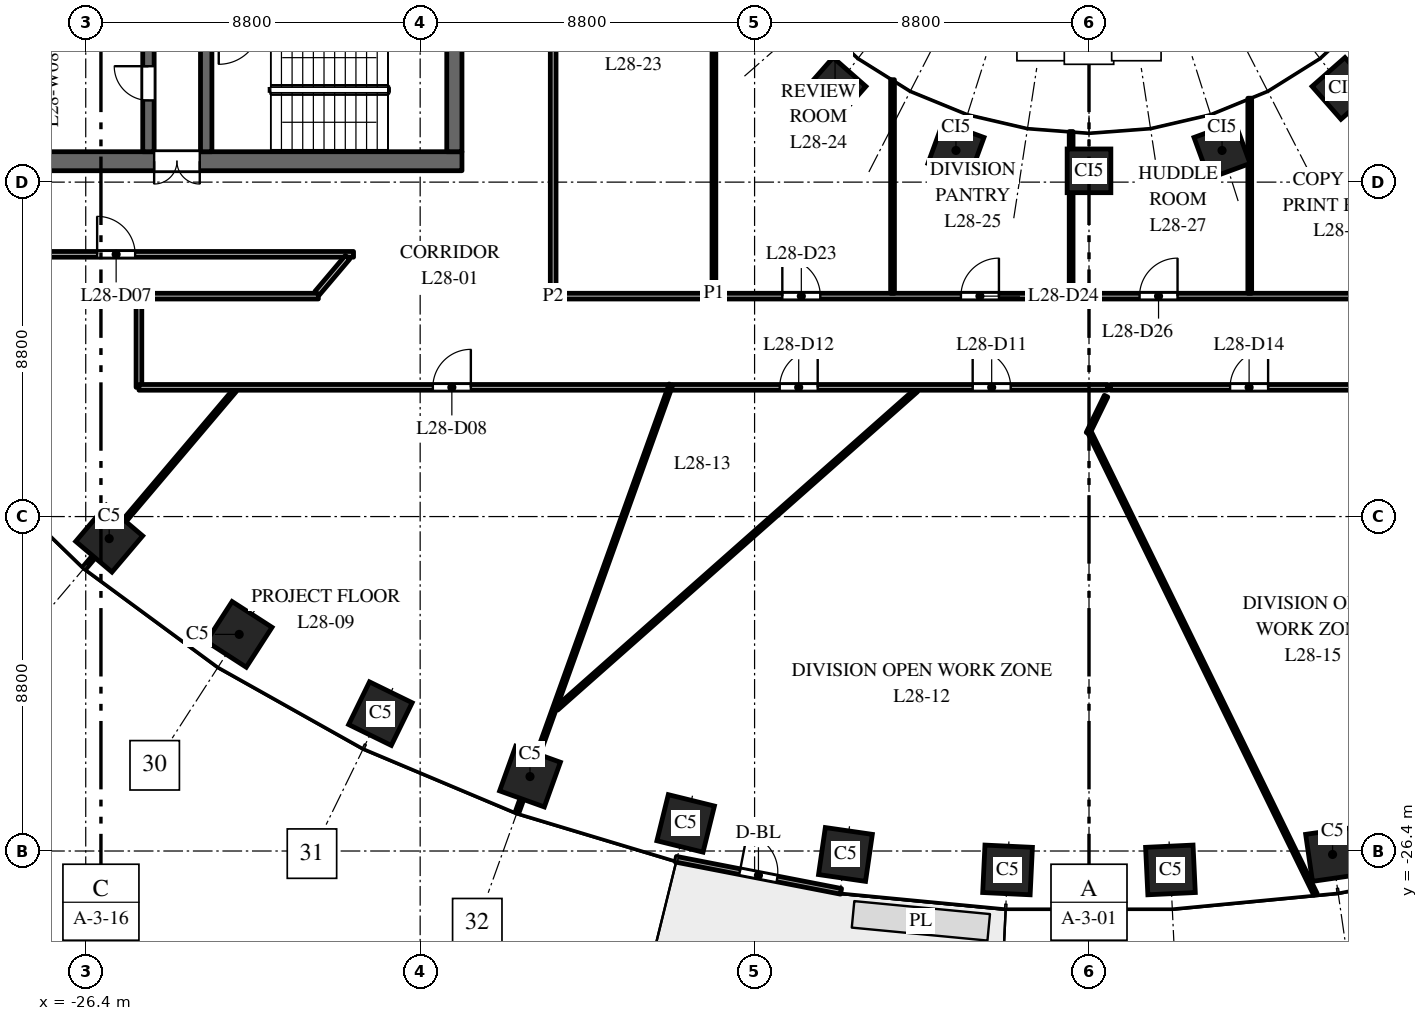
"""IFC4 building model, lengths in metres.
Left out: names, types, materials, properties, quantities, classifications, styles, units other than length and angle.
Written with IfcOpenShell. Run it as: python <this file> out.ifc"""

import sys

from ifc_helpers import new_model, si_unit, direction, frame, frame_2d, origin, origin_2d, place, context, subcontext, project, spatial, rectangle, extrude, element, fill, save


model = new_model("IFC4")
c1 = context("Model", 3, precision=1e-05, world=origin(), true_north=direction((0.0, 1.0)))
c2 = subcontext(c1, "Body", "Model", "MODEL_VIEW")
j1 = project(units=[si_unit("LENGTHUNIT", "METRE"), si_unit("PLANEANGLEUNIT", "RADIAN")], contexts=[c1])
p1 = place(None, origin())
s1 = spatial("IfcSite", under=j1, at=p1, CompositionType="ELEMENT")
p2 = place(p1, origin())
s2 = spatial("IfcBuilding", under=s1, at=p2, CompositionType="ELEMENT")
p3 = place(p2, frame((0.0, 0.0, 124.0)))
s3 = spatial("IfcBuildingStorey", under=s2, at=p3, CompositionType="ELEMENT", Elevation=124.0)
for number, where, z_axis, x_axis in (
    (1, (-25.783, -18.18, 0.0), (0.0, 0.0, 1.0), (0.763, -0.646, 0.0)),
    (2, (-22.362, -20.7, 0.0), (0.0, 0.0, 1.0), (0.84, -0.542, 0.0)),
    (3, (-18.646, -22.785, 0.0), (0.0, 0.0, 1.0), (0.898, -0.439, 0.0)),
    (4, (-14.709, -24.441, 0.0), (0.0, 0.0, 1.0), (0.941, -0.338, 0.0)),
    (5, (-10.613, -25.674, 0.0), (0.0, 0.0, 1.0), (0.971, -0.24, 0.0)),
    (6, (-6.409, -26.491, 0.0), (0.0, 0.0, 1.0), (0.99, -0.143, 0.0)),
    (7, (-2.143, -26.898, 0.0), (0.0, 0.0, 1.0), (0.999, -0.048, 0.0)),
    (8, (2.143, -26.898, 0.0), (0.0, 0.0, 1.0), (0.999, 0.048, 0.0)),
    (9, (6.409, -26.491, 0.0), (0.0, 0.0, 1.0), (0.99, 0.143, 0.0)),
):
    element("IfcColumn", number, at=place(p3, frame(where, z_axis=z_axis, x_axis=x_axis)), inside=s3, PredefinedType="COLUMN", context=c2, shape_type="SweptSolid", body=[
        extrude(rectangle(XDim=1.25, YDim=1.25, at=origin_2d()), origin(), (0.0, 0.0, 1.0), 4.0),
    ])
for number, where, z_axis, x_axis in (
    (10, (-6.682, -6.334, 0.0), (0.0, 0.0, 1.0), (0.751, -0.66, 0.0)),
    (11, (-3.501, -7.967, 0.0), (0.0, 0.0, 1.0), (0.939, -0.344, 0.0)),
    (12, (0.0, -8.503, 0.0), (0.0, 0.0, 1.0), (1.0, 0.0, 0.0)),
    (13, (3.501, -7.967, 0.0), (0.0, 0.0, 1.0), (0.939, 0.344, 0.0)),
    (14, (6.682, -6.334, 0.0), (0.0, 0.0, 1.0), (0.751, 0.66, 0.0)),
):
    element("IfcColumn", number, at=place(p3, frame(where, z_axis=z_axis, x_axis=x_axis)), inside=s3, PredefinedType="COLUMN", context=c2, shape_type="SweptSolid", body=[
        extrude(rectangle(XDim=1.15, YDim=1.15, at=origin_2d()), origin(), (0.0, 0.0, 1.0), 4.0),
    ])
p4 = place(p3, frame((-16.5, -8.25, 0.0), z_axis=(0.0, 0.0, 1.0), x_axis=(-1.0, 0.0, 0.0)))
e15 = element("IfcWall", 15, at=p4, inside=s3, PredefinedType="SHEAR", context=c2, shape_type="SweptSolid", body=[
    extrude(rectangle(XDim=15.0, YDim=0.5, at=frame_2d((7.5, 0.0))), origin(), (0.0, 0.0, 1.0), 3.7),
])
p5 = place(p4, frame((6.9, 0.0, 0.0)))
e16 = element("IfcOpeningElement", 16, at=p5, cuts=e15, PredefinedType="OPENING", context=c2, shape_type="SweptSolid", body=[
    extrude(rectangle(XDim=1.2, YDim=2.1, at=frame_2d((0.6, 1.05))), frame((0.0, 0.26, 0.0), z_axis=(0.0, -1.0, 0.0), x_axis=(1.0, 0.0, 0.0)), (0.0, 0.0, 1.0), 0.52),
])
p6 = place(p4, frame((12.425, 0.0, 0.0)))
e17 = element("IfcOpeningElement", 17, at=p6, cuts=e15, PredefinedType="OPENING", context=c2, shape_type="SweptSolid", body=[
    extrude(rectangle(XDim=0.9, YDim=2.1, at=frame_2d((0.45, 1.05))), frame((0.0, 0.26, 0.0), z_axis=(0.0, -1.0, 0.0), x_axis=(1.0, 0.0, 0.0)), (0.0, 0.0, 1.0), 0.52),
])
p7 = place(p3, frame((-24.75, -8.0, 0.0), z_axis=(0.0, 0.0, 1.0), x_axis=(0.0, 1.0, 0.0)))
e18 = element("IfcWall", 18, at=p7, inside=s3, PredefinedType="SHEAR", context=c2, shape_type="SweptSolid", body=[
    extrude(rectangle(XDim=16.0, YDim=0.3, at=frame_2d((8.0, 0.0))), origin(), (0.0, 0.0, 1.0), 3.7),
])
p8 = place(p7, frame((4.425, 0.0, 0.0)))
e19 = element("IfcOpeningElement", 19, at=p8, cuts=e18, PredefinedType="OPENING", context=c2, shape_type="SweptSolid", body=[
    extrude(rectangle(XDim=1.1, YDim=2.1, at=frame_2d((0.55, 1.05))), frame((0.0, 0.16, 0.0), z_axis=(0.0, -1.0, 0.0), x_axis=(1.0, 0.0, 0.0)), (0.0, 0.0, 1.0), 0.32),
])
p9 = place(p7, frame((7.45, 0.0, 0.0)))
e20 = element("IfcOpeningElement", 20, at=p9, cuts=e18, PredefinedType="OPENING", context=c2, shape_type="SweptSolid", body=[
    extrude(rectangle(XDim=1.1, YDim=2.1, at=frame_2d((0.55, 1.05))), frame((0.0, 0.16, 0.0), z_axis=(0.0, -1.0, 0.0), x_axis=(1.0, 0.0, 0.0)), (0.0, 0.0, 1.0), 0.32),
])
p10 = place(p7, frame((10.425, 0.0, 0.0)))
e21 = element("IfcOpeningElement", 21, at=p10, cuts=e18, PredefinedType="OPENING", context=c2, shape_type="SweptSolid", body=[
    extrude(rectangle(XDim=1.2, YDim=2.1, at=frame_2d((0.6, 1.05))), frame((0.0, 0.16, 0.0), z_axis=(0.0, -1.0, 0.0), x_axis=(1.0, 0.0, 0.0)), (0.0, 0.0, 1.0), 0.32),
])
p11 = place(p7, frame((13.125, 0.0, 0.0)))
e22 = element("IfcOpeningElement", 22, at=p11, cuts=e18, PredefinedType="OPENING", context=c2, shape_type="SweptSolid", body=[
    extrude(rectangle(XDim=0.9, YDim=2.1, at=frame_2d((0.45, 1.05))), frame((0.0, 0.16, 0.0), z_axis=(0.0, -1.0, 0.0), x_axis=(1.0, 0.0, 0.0)), (0.0, 0.0, 1.0), 0.32),
])
p12 = place(p7, frame((14.75, 0.0, 0.0)))
e23 = element("IfcOpeningElement", 23, at=p12, cuts=e18, PredefinedType="OPENING", context=c2, shape_type="SweptSolid", body=[
    extrude(rectangle(XDim=0.9, YDim=2.1, at=frame_2d((0.45, 1.05))), frame((0.0, 0.16, 0.0), z_axis=(0.0, -1.0, 0.0), x_axis=(1.0, 0.0, 0.0)), (0.0, 0.0, 1.0), 0.32),
])
p13 = place(p7, frame((1.35, 0.0, 0.0)))
e24 = element("IfcOpeningElement", 24, at=p13, cuts=e18, PredefinedType="OPENING", context=c2, shape_type="SweptSolid", body=[
    extrude(rectangle(XDim=0.9, YDim=2.1, at=frame_2d((0.45, 1.05))), frame((0.0, 0.16, 0.0), z_axis=(0.0, -1.0, 0.0), x_axis=(1.0, 0.0, 0.0)), (0.0, 0.0, 1.0), 0.32),
])
p14 = place(p3, frame((-16.7, -8.0, 0.0), z_axis=(0.0, 0.0, 1.0), x_axis=(0.0, 1.0, 0.0)))
e25 = element("IfcWall", 25, at=p14, inside=s3, PredefinedType="SHEAR", context=c2, shape_type="SweptSolid", body=[
    extrude(rectangle(XDim=16.0, YDim=0.4, at=frame_2d((8.0, 0.0))), origin(), (0.0, 0.0, 1.0), 3.7),
])
p15 = place(p3, frame((-23.23, -8.0, 0.0), z_axis=(0.0, 0.0, 1.0), x_axis=(0.0, 1.0, 0.0)))
e26 = element("IfcWall", 26, at=p15, inside=s3, PredefinedType="SHEAR", context=c2, shape_type="SweptSolid", body=[
    extrude(rectangle(XDim=7.875, YDim=0.3, at=frame_2d((3.938, 0.0))), origin(), (0.0, 0.0, 1.0), 3.7),
])
p16 = place(p15, frame((5.15, 0.0, 0.0)))
e27 = element("IfcOpeningElement", 27, at=p16, cuts=e26, PredefinedType="OPENING", context=c2, shape_type="SweptSolid", body=[
    extrude(rectangle(XDim=1.1, YDim=2.1, at=frame_2d((0.55, 1.05))), frame((0.0, 0.16, 0.0), z_axis=(0.0, -1.0, 0.0), x_axis=(1.0, 0.0, 0.0)), (0.0, 0.0, 1.0), 0.32),
])
p17 = place(p3, frame((-10.871, -26.617, 0.0), z_axis=(0.0, 0.0, 1.0), x_axis=(0.981631174778, -0.190788460615, 0.0)))
e28 = element("IfcWall", 28, at=p17, inside=s3, PredefinedType="STANDARD", context=c2, shape_type="SweptSolid", body=[
    extrude(rectangle(XDim=4.426, YDim=0.15, at=frame_2d((2.213, 0.0))), origin(), (0.0, 0.0, 1.0), 3.7),
])
p18 = place(p17, frame((1.713, 0.0, 0.0)))
e29 = element("IfcOpeningElement", 29, at=p18, cuts=e28, PredefinedType="OPENING", context=c2, shape_type="SweptSolid", body=[
    extrude(rectangle(XDim=1.0, YDim=2.4, at=frame_2d((0.5, 1.2))), frame((0.0, 0.085, 0.0), z_axis=(0.0, -1.0, 0.0), x_axis=(1.0, 0.0, 0.0)), (0.0, 0.0, 1.0), 0.17),
])
p19 = place(p3, frame((-31.5, -10.7, 0.0), z_axis=(0.0, 0.0, 1.0), x_axis=(1.0, 0.0, 0.0)))
e30 = element("IfcWall", 30, at=p19, inside=s3, PredefinedType="PARTITIONING", context=c2, shape_type="SweptSolid", body=[
    extrude(rectangle(XDim=12.147, YDim=0.15, at=frame_2d((6.073, 0.0))), origin(), (0.0, 0.0, 1.0), 3.1),
])
p20 = place(p19, frame((5.4, 0.0, 0.0)))
e31 = element("IfcOpeningElement", 31, at=p20, cuts=e30, PredefinedType="OPENING", context=c2, shape_type="SweptSolid", body=[
    extrude(rectangle(XDim=1.0, YDim=2.1, at=frame_2d((0.5, 1.05))), frame((0.0, 0.085, 0.0), z_axis=(0.0, -1.0, 0.0), x_axis=(1.0, 0.0, 0.0)), (0.0, 0.0, 1.0), 0.17),
])
p21 = place(p3, frame((-26.43, -18.945, 0.0), z_axis=(0.0, 0.0, 1.0), x_axis=(0.646335552338, 0.763053309923, 0.0)))
e32 = element("IfcWall", 32, at=p21, inside=s3, PredefinedType="PARTITIONING", context=c2, shape_type="SweptSolid", body=[
    extrude(rectangle(XDim=6.12, YDim=0.1, at=frame_2d((3.06, 0.0))), origin(), (0.0, 0.0, 1.0), 3.7),
])
p22 = place(p3, frame((-25.0, -14.2, 0.0), z_axis=(0.0, 0.0, 1.0), x_axis=(0.0, 1.0, 0.0)))
e33 = element("IfcWall", 33, at=p22, inside=s3, PredefinedType="PARTITIONING", context=c2, shape_type="SweptSolid", body=[
    extrude(rectangle(XDim=2.4, YDim=0.15, at=frame_2d((1.2, 0.0))), origin(), (0.0, 0.0, 1.0), 3.7),
])
p23 = place(p3, frame((-25.0, -14.2, 0.0), z_axis=(0.0, 0.0, 1.0), x_axis=(1.0, 0.0, 0.0)))
e34 = element("IfcWall", 34, at=p23, inside=s3, PredefinedType="PARTITIONING", context=c2, shape_type="SweptSolid", body=[
    extrude(rectangle(XDim=13.961, YDim=0.15, at=frame_2d((6.98, 0.0))), origin(), (0.0, 0.0, 1.0), 2.75),
])
p24 = place(p23, frame((7.734, 0.0, 0.0)))
e35 = element("IfcOpeningElement", 35, at=p24, cuts=e34, PredefinedType="OPENING", context=c2, shape_type="SweptSolid", body=[
    extrude(rectangle(XDim=1.0, YDim=2.1, at=frame_2d((0.5, 1.05))), frame((0.0, 0.085, 0.0), z_axis=(0.0, -1.0, 0.0), x_axis=(1.0, 0.0, 0.0)), (0.0, 0.0, 1.0), 0.17),
])
p25 = place(p3, frame((-25.0, -11.8, 0.0), z_axis=(0.0, 0.0, 1.0), x_axis=(1.0, 0.0, 0.0)))
e36 = element("IfcWall", 36, at=p25, inside=s3, PredefinedType="PARTITIONING", context=c2, shape_type="SweptSolid", body=[
    extrude(rectangle(XDim=4.721, YDim=0.15, at=frame_2d((2.36, 0.0))), origin(), (0.0, 0.0, 1.0), 3.7),
])
p26 = place(p3, frame((-20.313, -11.725, 0.0), z_axis=(0.0, 0.0, 1.0), x_axis=(0.646259667917, 0.763117580471, 0.0)))
e37 = element("IfcWall", 37, at=p26, inside=s3, PredefinedType="PARTITIONING", context=c2, shape_type="SweptSolid", body=[
    extrude(rectangle(XDim=1.241, YDim=0.15, at=frame_2d((0.621, 0.0))), origin(), (0.0, 0.0, 1.0), 3.7),
])
p27 = place(p3, frame((-15.049, -25.383, 0.0), z_axis=(0.0, 0.0, 1.0), x_axis=(0.338467907901, 0.940977935619, 0.0)))
e38 = element("IfcWall", 38, at=p27, inside=s3, PredefinedType="PARTITIONING", context=c2, shape_type="SweptSolid", body=[
    extrude(rectangle(XDim=11.96, YDim=0.1, at=frame_2d((5.98, 0.0))), origin(), (0.0, 0.0, 1.0), 2.9),
])
p28 = place(p3, frame((-14.1, -11.8, 0.0), z_axis=(0.0, 0.0, 1.0), x_axis=(0.0, 1.0, 0.0)))
e39 = element("IfcWall", 39, at=p28, inside=s3, PredefinedType="PARTITIONING", context=c2, shape_type="SweptSolid", body=[
    extrude(rectangle(XDim=23.6, YDim=0.15, at=frame_2d((11.8, 0.0))), origin(), (0.0, 0.0, 1.0), 2.75),
])
p29 = place(p28, frame((11.4, 0.0, 0.0)))
e40 = element("IfcOpeningElement", 40, at=p29, cuts=e39, PredefinedType="OPENING", context=c2, shape_type="SweptSolid", body=[
    extrude(rectangle(XDim=1.0, YDim=2.1, at=frame_2d((0.5, 1.05))), frame((0.0, 0.085, 0.0), z_axis=(0.0, -1.0, 0.0), x_axis=(1.0, 0.0, 0.0)), (0.0, 0.0, 1.0), 0.17),
])
p30 = place(p3, frame((-14.1, -11.8, 0.0), z_axis=(0.0, 0.0, 1.0), x_axis=(1.0, 0.0, 0.0)))
e41 = element("IfcWall", 41, at=p30, inside=s3, PredefinedType="PARTITIONING", context=c2, shape_type="SweptSolid", body=[
    extrude(rectangle(XDim=28.2, YDim=0.15, at=frame_2d((14.1, 0.0))), origin(), (0.0, 0.0, 1.0), 2.85),
])
p31 = place(p30, frame((6.03, 0.0, 0.0)))
e42 = element("IfcOpeningElement", 42, at=p31, cuts=e41, PredefinedType="OPENING", context=c2, shape_type="SweptSolid", body=[
    extrude(rectangle(XDim=1.0, YDim=2.1, at=frame_2d((0.5, 1.05))), frame((0.0, 0.085, 0.0), z_axis=(0.0, -1.0, 0.0), x_axis=(1.0, 0.0, 0.0)), (0.0, 0.0, 1.0), 0.17),
])
p32 = place(p30, frame((10.73, 0.0, 0.0)))
e43 = element("IfcOpeningElement", 43, at=p32, cuts=e41, PredefinedType="OPENING", context=c2, shape_type="SweptSolid", body=[
    extrude(rectangle(XDim=1.0, YDim=2.1, at=frame_2d((0.5, 1.05))), frame((0.0, 0.085, 0.0), z_axis=(0.0, -1.0, 0.0), x_axis=(1.0, 0.0, 0.0)), (0.0, 0.0, 1.0), 0.17),
])
p33 = place(p30, frame((15.43, 0.0, 0.0)))
e44 = element("IfcOpeningElement", 44, at=p33, cuts=e41, PredefinedType="OPENING", context=c2, shape_type="SweptSolid", body=[
    extrude(rectangle(XDim=1.0, YDim=2.1, at=frame_2d((0.5, 1.05))), frame((0.0, 0.085, 0.0), z_axis=(0.0, -1.0, 0.0), x_axis=(1.0, 0.0, 0.0)), (0.0, 0.0, 1.0), 0.17),
])
p34 = place(p3, frame((-14.014, -22.654, 0.0), z_axis=(0.0, 0.0, 1.0), x_axis=(0.749047794047, 0.662515963757, 0.0)))
e45 = element("IfcWall", 45, at=p34, inside=s3, PredefinedType="PARTITIONING", context=c2, shape_type="SweptSolid", body=[
    extrude(rectangle(XDim=12.643, YDim=0.1, at=frame_2d((6.321, 0.0))), origin(), (0.0, 0.0, 1.0), 2.85),
])
p35 = place(p3, frame((-10.974, -14.2, 0.0), z_axis=(0.0, 0.0, 1.0), x_axis=(1.0, 0.0, 0.0)))
e46 = element("IfcWall", 46, at=p35, inside=s3, PredefinedType="PARTITIONING", context=c2, shape_type="SweptSolid", body=[
    extrude(rectangle(XDim=11.462, YDim=0.15, at=frame_2d((5.731, 0.0))), origin(), (0.0, 0.0, 1.0), 2.85),
])
p36 = place(p35, frame((7.913, 0.0, 0.0)))
e47 = element("IfcOpeningElement", 47, at=p36, cuts=e46, PredefinedType="OPENING", context=c2, shape_type="SweptSolid", body=[
    extrude(rectangle(XDim=1.0, YDim=2.1, at=frame_2d((0.5, 1.05))), frame((0.0, 0.085, 0.0), z_axis=(0.0, -1.0, 0.0), x_axis=(1.0, 0.0, 0.0)), (0.0, 0.0, 1.0), 0.17),
])
p37 = place(p35, frame((2.835, 0.0, 0.0)))
e48 = element("IfcOpeningElement", 48, at=p37, cuts=e46, PredefinedType="OPENING", context=c2, shape_type="SweptSolid", body=[
    extrude(rectangle(XDim=1.0, YDim=2.1, at=frame_2d((0.5, 1.05))), frame((0.0, 0.085, 0.0), z_axis=(0.0, -1.0, 0.0), x_axis=(1.0, 0.0, 0.0)), (0.0, 0.0, 1.0), 0.17),
])
p38 = place(p3, frame((-9.87, -11.725, 0.0), z_axis=(0.0, 0.0, 1.0), x_axis=(0.0, 1.0, 0.0)))
e49 = element("IfcWall", 49, at=p38, inside=s3, PredefinedType="PARTITIONING", context=c2, shape_type="SweptSolid", body=[
    extrude(rectangle(XDim=23.45, YDim=0.1, at=frame_2d((11.725, 0.0))), origin(), (0.0, 0.0, 1.0), 2.75),
])
p39 = place(p3, frame((-5.17, -11.725, 0.0), z_axis=(0.0, 0.0, 1.0), x_axis=(0.0, 1.0, 0.0)))
e50 = element("IfcWall", 50, at=p39, inside=s3, PredefinedType="PARTITIONING", context=c2, shape_type="SweptSolid", body=[
    extrude(rectangle(XDim=5.62, YDim=0.1, at=frame_2d((2.81, 0.0))), origin(), (0.0, 0.0, 1.0), 2.9),
])
p40 = place(p3, frame((-0.47, -11.725, 0.0), z_axis=(0.0, 0.0, 1.0), x_axis=(0.0, 1.0, 0.0)))
e51 = element("IfcWall", 51, at=p40, inside=s3, PredefinedType="PARTITIONING", context=c2, shape_type="SweptSolid", body=[
    extrude(rectangle(XDim=4.256, YDim=0.1, at=frame_2d((2.128, 0.0))), origin(), (0.0, 0.0, 1.0), 2.9),
])
p41 = place(p3, frame((-0.028, -15.409, 0.0), z_axis=(0.0, 0.0, 1.0), x_axis=(0.438750971543, 0.898608694021, 0.0)))
e52 = element("IfcWall", 52, at=p41, inside=s3, PredefinedType="PARTITIONING", context=c2, shape_type="SweptSolid", body=[
    extrude(rectangle(XDim=1.087, YDim=0.1, at=frame_2d((0.544, 0.0))), origin(), (0.0, 0.0, 1.0), 3.7),
])
p42 = place(p3, frame((0.028, -15.409, 0.0), z_axis=(0.0, 0.0, 1.0), x_axis=(0.439217591491, -0.898380714021, 0.0)))
e53 = element("IfcWall", 53, at=p42, inside=s3, PredefinedType="PARTITIONING", context=c2, shape_type="SweptSolid", body=[
    extrude(rectangle(XDim=13.501, YDim=0.1, at=frame_2d((6.75, 0.0))), origin(), (0.0, 0.0, 1.0), 2.9),
])
p43 = place(p3, frame((0.563, -14.2, 0.0), z_axis=(0.0, 0.0, 1.0), x_axis=(1.0, 0.0, 0.0)))
e54 = element("IfcWall", 54, at=p43, inside=s3, PredefinedType="PARTITIONING", context=c2, shape_type="SweptSolid", body=[
    extrude(rectangle(XDim=7.216, YDim=0.15, at=frame_2d((3.608, 0.0))), origin(), (0.0, 0.0, 1.0), 2.85),
])
p44 = place(p43, frame((3.15, 0.0, 0.0)))
e55 = element("IfcOpeningElement", 55, at=p44, cuts=e54, PredefinedType="OPENING", context=c2, shape_type="SweptSolid", body=[
    extrude(rectangle(XDim=1.0, YDim=2.1, at=frame_2d((0.5, 1.05))), frame((0.0, 0.085, 0.0), z_axis=(0.0, -1.0, 0.0), x_axis=(1.0, 0.0, 0.0)), (0.0, 0.0, 1.0), 0.17),
])
p45 = place(p3, frame((4.23, -11.725, 0.0), z_axis=(0.0, 0.0, 1.0), x_axis=(0.0, 1.0, 0.0)))
e56 = element("IfcWall", 56, at=p45, inside=s3, PredefinedType="PARTITIONING", context=c2, shape_type="SweptSolid", body=[
    extrude(rectangle(XDim=5.133, YDim=0.1, at=frame_2d((2.566, 0.0))), origin(), (0.0, 0.0, 1.0), 2.9),
])
p46 = place(p5, origin())
e57 = element("IfcDoor", 57, at=p46, inside=s3, OperationType="DOUBLE_DOOR_DOUBLE_SWING", PredefinedType="DOOR", context=c2, shape_type="SweptSolid", body=[
    extrude(rectangle(XDim=1.2, YDim=2.1, at=frame_2d((0.6, 1.05))), frame((0.0, 0.025, 0.0), z_axis=(0.0, -1.0, 0.0), x_axis=(1.0, 0.0, 0.0)), (0.0, 0.0, 1.0), 0.05),
])
fill(e16, e57)
p47 = place(p13, origin())
e58 = element("IfcDoor", 58, at=p47, inside=s3, OperationType="SINGLE_SWING_LEFT", PredefinedType="DOOR", context=c2, shape_type="SweptSolid", body=[
    extrude(rectangle(XDim=0.9, YDim=2.1, at=frame_2d((0.45, 1.05))), frame((0.0, 0.025, 0.0), z_axis=(0.0, -1.0, 0.0), x_axis=(1.0, 0.0, 0.0)), (0.0, 0.0, 1.0), 0.05),
])
fill(e24, e58)
p48 = place(p18, origin())
e59 = element("IfcDoor", 59, at=p48, inside=s3, OperationType="SINGLE_SWING_LEFT", PredefinedType="DOOR", context=c2, shape_type="SweptSolid", body=[
    extrude(rectangle(XDim=1.0, YDim=2.4, at=frame_2d((0.5, 1.2))), frame((0.0, 0.025, 0.0), z_axis=(0.0, -1.0, 0.0), x_axis=(1.0, 0.0, 0.0)), (0.0, 0.0, 1.0), 0.05),
])
fill(e29, e59)
p49 = place(p20, origin())
e60 = element("IfcDoor", 60, at=p49, inside=s3, OperationType="SINGLE_SWING_LEFT", PredefinedType="DOOR", context=c2, shape_type="SweptSolid", body=[
    extrude(rectangle(XDim=1.0, YDim=2.1, at=frame_2d((0.5, 1.05))), frame((0.0, 0.025, 0.0), z_axis=(0.0, -1.0, 0.0), x_axis=(1.0, 0.0, 0.0)), (0.0, 0.0, 1.0), 0.05),
])
fill(e31, e60)
p50 = place(p24, origin())
e61 = element("IfcDoor", 61, at=p50, inside=s3, OperationType="SINGLE_SWING_RIGHT", PredefinedType="DOOR", context=c2, shape_type="SweptSolid", body=[
    extrude(rectangle(XDim=1.0, YDim=2.1, at=frame_2d((0.5, 1.05))), frame((0.0, 0.025, 0.0), z_axis=(0.0, -1.0, 0.0), x_axis=(1.0, 0.0, 0.0)), (0.0, 0.0, 1.0), 0.05),
])
fill(e35, e61)
p51 = place(p36, origin())
e62 = element("IfcDoor", 62, at=p51, inside=s3, OperationType="SINGLE_SWING_LEFT", PredefinedType="DOOR", context=c2, shape_type="SweptSolid", body=[
    extrude(rectangle(XDim=1.0, YDim=2.1, at=frame_2d((0.5, 1.05))), frame((0.0, 0.025, 0.0), z_axis=(0.0, -1.0, 0.0), x_axis=(1.0, 0.0, 0.0)), (0.0, 0.0, 1.0), 0.05),
])
fill(e47, e62)
p52 = place(p37, origin())
e63 = element("IfcDoor", 63, at=p52, inside=s3, OperationType="SINGLE_SWING_RIGHT", PredefinedType="DOOR", context=c2, shape_type="SweptSolid", body=[
    extrude(rectangle(XDim=1.0, YDim=2.1, at=frame_2d((0.5, 1.05))), frame((0.0, 0.025, 0.0), z_axis=(0.0, -1.0, 0.0), x_axis=(1.0, 0.0, 0.0)), (0.0, 0.0, 1.0), 0.05),
])
fill(e48, e63)
p53 = place(p44, origin())
e64 = element("IfcDoor", 64, at=p53, inside=s3, OperationType="SINGLE_SWING_RIGHT", PredefinedType="DOOR", context=c2, shape_type="SweptSolid", body=[
    extrude(rectangle(XDim=1.0, YDim=2.1, at=frame_2d((0.5, 1.05))), frame((0.0, 0.025, 0.0), z_axis=(0.0, -1.0, 0.0), x_axis=(1.0, 0.0, 0.0)), (0.0, 0.0, 1.0), 0.05),
])
fill(e55, e64)
p54 = place(p31, origin())
e65 = element("IfcDoor", 65, at=p54, inside=s3, OperationType="SINGLE_SWING_LEFT", PredefinedType="DOOR", context=c2, shape_type="SweptSolid", body=[
    extrude(rectangle(XDim=1.0, YDim=2.1, at=frame_2d((0.5, 1.05))), frame((0.0, 0.025, 0.0), z_axis=(0.0, -1.0, 0.0), x_axis=(1.0, 0.0, 0.0)), (0.0, 0.0, 1.0), 0.05),
])
fill(e42, e65)
p55 = place(p32, origin())
e66 = element("IfcDoor", 66, at=p55, inside=s3, OperationType="SINGLE_SWING_RIGHT", PredefinedType="DOOR", context=c2, shape_type="SweptSolid", body=[
    extrude(rectangle(XDim=1.0, YDim=2.1, at=frame_2d((0.5, 1.05))), frame((0.0, 0.025, 0.0), z_axis=(0.0, -1.0, 0.0), x_axis=(1.0, 0.0, 0.0)), (0.0, 0.0, 1.0), 0.05),
])
fill(e43, e66)
p56 = place(p33, origin())
e67 = element("IfcDoor", 67, at=p56, inside=s3, OperationType="SINGLE_SWING_RIGHT", PredefinedType="DOOR", context=c2, shape_type="SweptSolid", body=[
    extrude(rectangle(XDim=1.0, YDim=2.1, at=frame_2d((0.5, 1.05))), frame((0.0, 0.025, 0.0), z_axis=(0.0, -1.0, 0.0), x_axis=(1.0, 0.0, 0.0)), (0.0, 0.0, 1.0), 0.05),
])
fill(e44, e67)
save(model, sys.argv[1])
